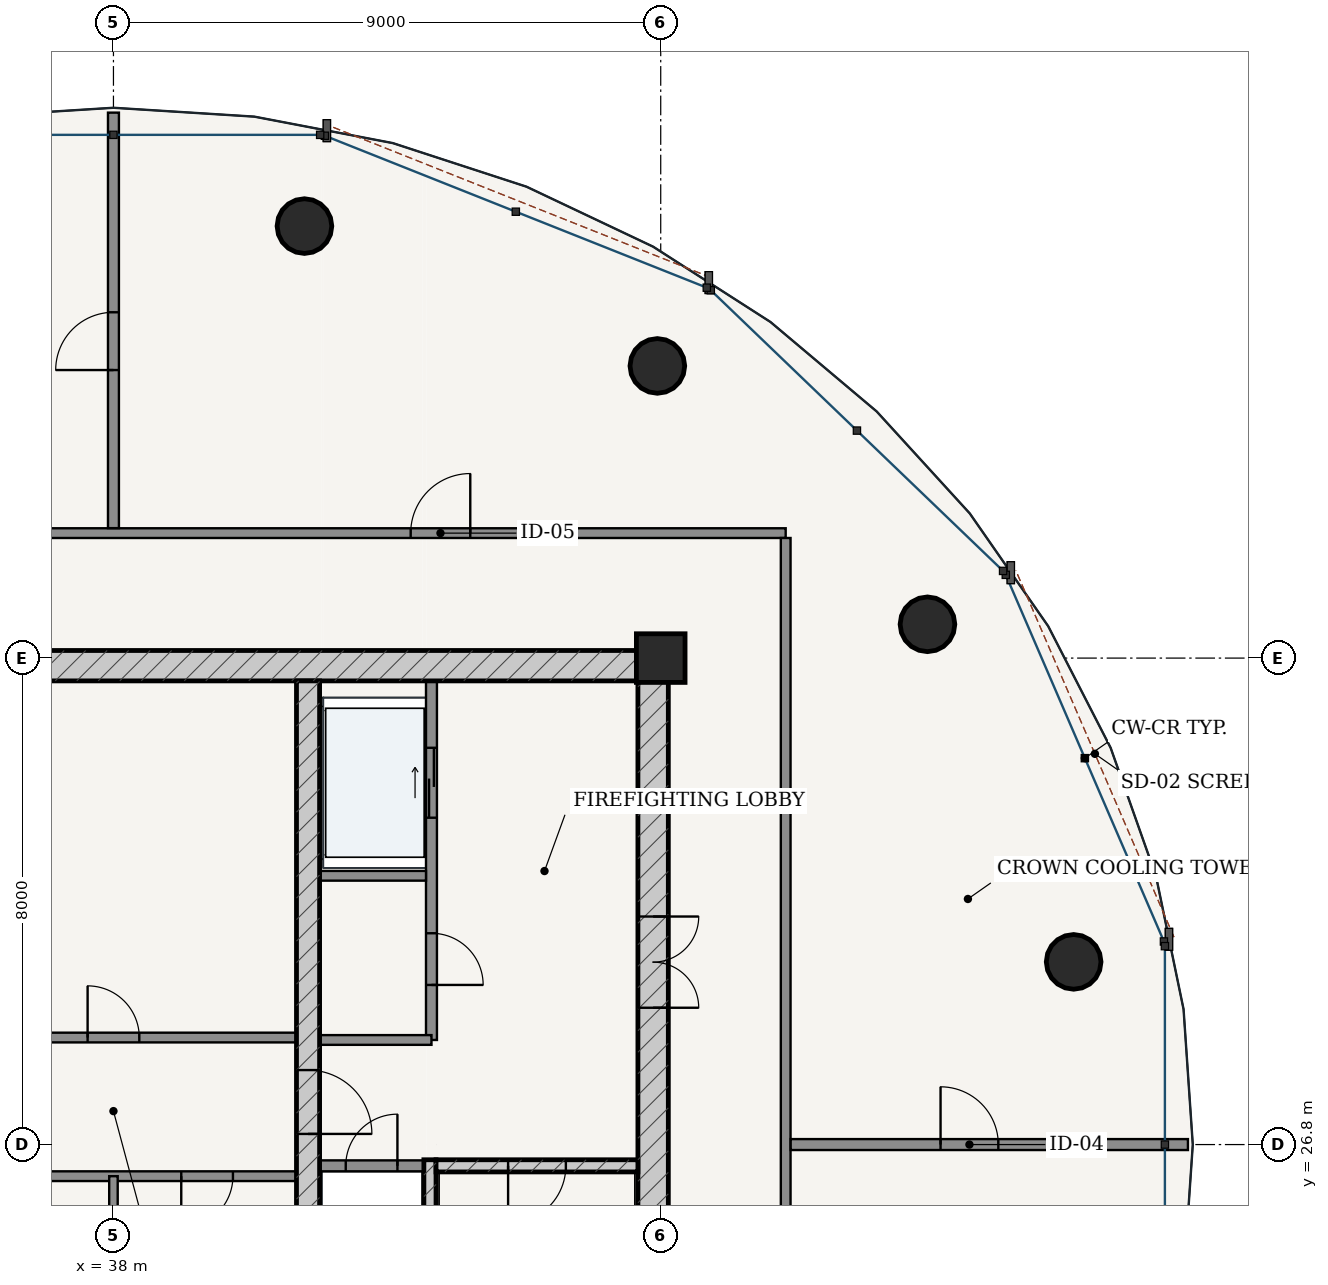
"""IFC4 building model, lengths in metres.
Left out: names, types, materials, properties, quantities, classifications, styles, units other than length and angle.
Written with IfcOpenShell. Run it as: python <this file> out.ifc"""

import sys

from ifc_helpers import new_model, si_unit, direction, frame, frame_2d, origin, origin_2d, place, context, subcontext, project, spatial, rectangle, hollow_circle, extrude, source, transform, mapped, element, fill, save


model = new_model("IFC4")
c1 = context("Model", 3, precision=1e-05, world=origin(), true_north=direction((-0.2419218956, 0.970295726276)))
c2 = subcontext(c1, "Body", "Model", "MODEL_VIEW")
j1 = project(units=[si_unit("LENGTHUNIT", "METRE"), si_unit("PLANEANGLEUNIT", "RADIAN")], contexts=[c1])
p1 = place(None, origin())
s1 = spatial("IfcSite", under=j1, at=p1, CompositionType="ELEMENT")
p2 = place(p1, origin())
s2 = spatial("IfcBuilding", under=s1, at=p2, CompositionType="ELEMENT")
p3 = place(p2, frame((0.0, 0.0, 311.3)))
s3 = spatial("IfcBuildingStorey", under=s2, at=p3, CompositionType="ELEMENT", Elevation=311.3)
p4 = place(p3, frame((47.0, 34.8, 0.0), z_axis=(0.0, 0.0, 1.0), x_axis=(1.0, 0.0, 0.0)))
e1 = element("IfcColumn", 1, at=p4, inside=s3, PredefinedType="COLUMN", context=c2, shape_type="SweptSolid", body=[
    extrude(rectangle(XDim=0.8, YDim=0.8, at=origin_2d()), origin(), (0.0, 0.0, 1.0), 5.2),
])
p5 = place(p3, frame((28.875, 34.675, 0.0), z_axis=(0.0, 0.0, 1.0), x_axis=(1.0, 0.0, 0.0)))
e2 = element("IfcWall", 2, at=p5, inside=s3, PredefinedType="SHEAR", context=c2, shape_type="SweptSolid", body=[
    extrude(rectangle(XDim=18.25, YDim=0.5, at=frame_2d((9.125, 0.0))), origin(), (0.0, 0.0, 1.0), 4.78),
])
p6 = place(p3, frame((46.875, 19.175, 0.0), z_axis=(0.0, 0.0, 1.0), x_axis=(0.0, 1.0, 0.0)))
e3 = element("IfcWall", 3, at=p6, inside=s3, PredefinedType="SHEAR", context=c2, shape_type="SweptSolid", body=[
    extrude(rectangle(XDim=15.25, YDim=0.5, at=frame_2d((7.625, 0.0))), origin(), (0.0, 0.0, 1.0), 4.78),
])
p7 = place(p6, frame((9.875, 0.0, 0.0)))
e4 = element("IfcOpeningElement", 4, at=p7, cuts=e3, PredefinedType="OPENING", context=c2, shape_type="SweptSolid", body=[
    extrude(rectangle(XDim=1.5, YDim=2.2, at=frame_2d((0.75, 1.1))), frame((0.0, 0.26, 0.0), z_axis=(0.0, -1.0, 0.0), x_axis=(1.0, 0.0, 0.0)), (0.0, 0.0, 1.0), 0.52),
])
p8 = place(p3, frame((43.205, 19.175, 0.0), z_axis=(0.0, 0.0, 1.0), x_axis=(0.0, 1.0, 0.0)))
e5 = element("IfcWall", 5, at=p8, inside=s3, PredefinedType="SOLIDWALL", context=c2, shape_type="SweptSolid", body=[
    extrude(rectangle(XDim=7.375, YDim=0.2, at=frame_2d((3.688, 0.0))), origin(), (0.0, 0.0, 1.0), 4.78),
])
p9 = place(p3, frame((43.305, 26.45, 0.0), z_axis=(0.0, 0.0, 1.0), x_axis=(1.0, 0.0, 0.0)))
e6 = element("IfcWall", 6, at=p9, inside=s3, PredefinedType="SOLIDWALL", context=c2, shape_type="SweptSolid", body=[
    extrude(rectangle(XDim=3.32, YDim=0.2, at=frame_2d((1.66, 0.0))), origin(), (0.0, 0.0, 1.0), 4.78),
])
p10 = place(p9, frame((1.185, 0.0, 0.0)))
e7 = element("IfcOpeningElement", 7, at=p10, cuts=e6, PredefinedType="OPENING", context=c2, shape_type="SweptSolid", body=[
    extrude(rectangle(XDim=0.95, YDim=2.15, at=frame_2d((0.475, 1.075))), frame((0.0, 0.11, 0.0), z_axis=(0.0, -1.0, 0.0), x_axis=(1.0, 0.0, 0.0)), (0.0, 0.0, 1.0), 0.22),
])
p11 = place(p3, frame((41.2, 19.175, 0.0), z_axis=(0.0, 0.0, 1.0), x_axis=(0.0, 1.0, 0.0)))
e8 = element("IfcWall", 8, at=p11, inside=s3, PredefinedType="SHEAR", context=c2, shape_type="SweptSolid", body=[
    extrude(rectangle(XDim=15.25, YDim=0.38, at=frame_2d((7.625, 0.0))), origin(), (0.0, 0.0, 1.0), 4.78),
])
p12 = place(p11, frame((7.8, 0.0, 0.0)))
e9 = element("IfcOpeningElement", 9, at=p12, cuts=e8, PredefinedType="OPENING", context=c2, shape_type="SweptSolid", body=[
    extrude(rectangle(XDim=1.05, YDim=2.15, at=frame_2d((0.525, 1.075))), frame((0.0, 0.2, 0.0), z_axis=(0.0, -1.0, 0.0), x_axis=(1.0, 0.0, 0.0)), (0.0, 0.0, 1.0), 0.4),
])
for number, where, z_axis, x_axis in (
    (10, (53.791, 29.804, 0.0), (0.0, 0.0, 1.0), (1.0, 0.0, 0.0)),
    (11, (51.387, 35.356, 0.0), (0.0, 0.0, 1.0), (1.0, 0.0, 0.0)),
    (12, (46.945, 39.605, 0.0), (0.0, 0.0, 1.0), (1.0, 0.0, 0.0)),
    (13, (41.141, 41.904, 0.0), (0.0, 0.0, 1.0), (1.0, 0.0, 0.0)),
):
    element("IfcColumn", number, at=place(p3, frame(where, z_axis=z_axis, x_axis=x_axis)), inside=s3, PredefinedType="COLUMN", context=c2, shape_type="SweptSolid", body=[
        extrude(hollow_circle(Radius=0.45, WallThickness=0.032, at=origin_2d()), origin(), (0.0, 0.0, 1.0), 5.2),
    ])
p13 = place(p3, frame((41.39, 26.45, 0.0), z_axis=(0.0, 0.0, 1.0), x_axis=(1.0, 0.0, 0.0)))
e14 = element("IfcWall", 14, at=p13, inside=s3, PredefinedType="PARTITIONING", context=c2, shape_type="SweptSolid", body=[
    extrude(rectangle(XDim=1.71, YDim=0.18, at=frame_2d((0.855, 0.0))), origin(), (0.0, 0.0, 1.0), 4.78),
])
p14 = place(p13, frame((0.43, 0.0, 0.0)))
e15 = element("IfcOpeningElement", 15, at=p14, cuts=e14, PredefinedType="OPENING", context=c2, shape_type="SweptSolid", body=[
    extrude(rectangle(XDim=0.85, YDim=2.1, at=frame_2d((0.425, 1.05))), frame((0.0, 0.1, 0.0), z_axis=(0.0, -1.0, 0.0), x_axis=(1.0, 0.0, 0.0)), (0.0, 0.0, 1.0), 0.2),
])
p15 = place(p3, frame((43.23, 28.52, 0.0), z_axis=(0.0, 0.0, 1.0), x_axis=(0.0, 1.0, 0.0)))
e16 = element("IfcWall", 16, at=p15, inside=s3, PredefinedType="PARTITIONING", context=c2, shape_type="SweptSolid", body=[
    extrude(rectangle(XDim=5.905, YDim=0.18, at=frame_2d((2.953, 0.0))), origin(), (0.0, 0.0, 1.0), 4.78),
])
p16 = place(p15, frame((0.905, 0.0, 0.0)))
e17 = element("IfcOpeningElement", 17, at=p16, cuts=e16, PredefinedType="OPENING", context=c2, shape_type="SweptSolid", body=[
    extrude(rectangle(XDim=0.85, YDim=2.1, at=frame_2d((0.425, 1.05))), frame((0.0, 0.1, 0.0), z_axis=(0.0, -1.0, 0.0), x_axis=(1.0, 0.0, 0.0)), (0.0, 0.0, 1.0), 0.2),
])
p17 = place(p15, frame((3.655, 0.0, 0.0)))
e18 = element("IfcOpeningElement", 18, at=p17, cuts=e16, PredefinedType="OPENING", context=c2, shape_type="SweptSolid", body=[
    extrude(rectangle(XDim=1.15, YDim=2.2, at=frame_2d((0.575, 1.1))), frame((0.0, 0.1, 0.0), z_axis=(0.0, -1.0, 0.0), x_axis=(1.0, 0.0, 0.0)), (0.0, 0.0, 1.0), 0.2),
])
p18 = place(p3, frame((41.39, 31.22, 0.0), z_axis=(0.0, 0.0, 1.0), x_axis=(1.0, 0.0, 0.0)))
e19 = element("IfcWall", 19, at=p18, inside=s3, PredefinedType="PARTITIONING", context=c2, shape_type="SweptSolid", body=[
    extrude(rectangle(XDim=1.75, YDim=0.16, at=frame_2d((0.875, 0.0))), origin(), (0.0, 0.0, 1.0), 4.78),
])
p19 = place(p3, frame((41.39, 28.52, 0.0), z_axis=(0.0, 0.0, 1.0), x_axis=(1.0, 0.0, 0.0)))
e20 = element("IfcWall", 20, at=p19, inside=s3, PredefinedType="PARTITIONING", context=c2, shape_type="SweptSolid", body=[
    extrude(rectangle(XDim=1.84, YDim=0.16, at=frame_2d((0.92, 0.0))), origin(), (0.0, 0.0, 1.0), 4.78),
])
p20 = place(p3, frame((34.99, 28.56, 0.0), z_axis=(0.0, 0.0, 1.0), x_axis=(1.0, 0.0, 0.0)))
e21 = element("IfcWall", 21, at=p20, inside=s3, PredefinedType="PARTITIONING", context=c2, shape_type="SweptSolid", body=[
    extrude(rectangle(XDim=6.02, YDim=0.16, at=frame_2d((3.01, 0.0))), origin(), (0.0, 0.0, 1.0), 4.78),
])
p21 = place(p20, frame((2.585, 0.0, 0.0)))
e22 = element("IfcOpeningElement", 22, at=p21, cuts=e21, PredefinedType="OPENING", context=c2, shape_type="SweptSolid", body=[
    extrude(rectangle(XDim=0.85, YDim=2.1, at=frame_2d((0.425, 1.05))), frame((0.0, 0.09, 0.0), z_axis=(0.0, -1.0, 0.0), x_axis=(1.0, 0.0, 0.0)), (0.0, 0.0, 1.0), 0.18),
])
p22 = place(p3, frame((34.99, 26.28, 0.0), z_axis=(0.0, 0.0, 1.0), x_axis=(1.0, 0.0, 0.0)))
e23 = element("IfcWall", 23, at=p22, inside=s3, PredefinedType="PARTITIONING", context=c2, shape_type="SweptSolid", body=[
    extrude(rectangle(XDim=6.02, YDim=0.16, at=frame_2d((3.01, 0.0))), origin(), (0.0, 0.0, 1.0), 4.78),
])
p23 = place(p22, frame((1.045, 0.0, 0.0)))
e24 = element("IfcOpeningElement", 24, at=p23, cuts=e23, PredefinedType="OPENING", context=c2, shape_type="SweptSolid", body=[
    extrude(rectangle(XDim=0.85, YDim=2.1, at=frame_2d((0.425, 1.05))), frame((0.0, 0.09, 0.0), z_axis=(0.0, -1.0, 0.0), x_axis=(1.0, 0.0, 0.0)), (0.0, 0.0, 1.0), 0.18),
])
p24 = place(p22, frame((4.125, 0.0, 0.0)))
e25 = element("IfcOpeningElement", 25, at=p24, cuts=e23, PredefinedType="OPENING", context=c2, shape_type="SweptSolid", body=[
    extrude(rectangle(XDim=0.85, YDim=2.1, at=frame_2d((0.425, 1.05))), frame((0.0, 0.09, 0.0), z_axis=(0.0, -1.0, 0.0), x_axis=(1.0, 0.0, 0.0)), (0.0, 0.0, 1.0), 0.18),
])
p25 = place(p3, frame((38.0, 23.72, 0.0), z_axis=(0.0, 0.0, 1.0), x_axis=(0.0, 1.0, 0.0)))
e26 = element("IfcWall", 26, at=p25, inside=s3, PredefinedType="PARTITIONING", context=c2, shape_type="SweptSolid", body=[
    extrude(rectangle(XDim=2.56, YDim=0.14, at=frame_2d((1.28, 0.0))), origin(), (0.0, 0.0, 1.0), 4.78),
])
p26 = place(p3, frame((26.945, 36.855, 0.0), z_axis=(0.0, 0.0, 1.0), x_axis=(1.0, 0.0, 0.0)))
e27 = element("IfcWall", 27, at=p26, inside=s3, PredefinedType="PARTITIONING", context=c2, shape_type="SweptSolid", body=[
    extrude(rectangle(XDim=22.11, YDim=0.16, at=frame_2d((11.055, 0.0))), origin(), (0.0, 0.0, 1.0), 4.352),
])
p27 = place(p26, frame((15.943, 0.0, 0.0)))
e28 = element("IfcOpeningElement", 28, at=p27, cuts=e27, PredefinedType="OPENING", context=c2, shape_type="SweptSolid", body=[
    extrude(rectangle(XDim=0.98, YDim=2.2, at=frame_2d((0.49, 1.1))), frame((0.0, 0.09, 0.0), z_axis=(0.0, -1.0, 0.0), x_axis=(1.0, 0.0, 0.0)), (0.0, 0.0, 1.0), 0.18),
])
p28 = place(p26, frame((5.187, 0.0, 0.0)))
e29 = element("IfcOpeningElement", 29, at=p28, cuts=e27, PredefinedType="OPENING", context=c2, shape_type="SweptSolid", body=[
    extrude(rectangle(XDim=0.98, YDim=2.2, at=frame_2d((0.49, 1.1))), frame((0.0, 0.09, 0.0), z_axis=(0.0, -1.0, 0.0), x_axis=(1.0, 0.0, 0.0)), (0.0, 0.0, 1.0), 0.18),
])
p29 = place(p3, frame((49.055, 16.825, 0.0), z_axis=(0.0, 0.0, 1.0), x_axis=(0.0, 1.0, 0.0)))
e30 = element("IfcWall", 30, at=p29, inside=s3, PredefinedType="PARTITIONING", context=c2, shape_type="SweptSolid", body=[
    extrude(rectangle(XDim=19.95, YDim=0.16, at=frame_2d((9.975, 0.0))), origin(), (0.0, 0.0, 1.0), 4.352),
])
p30 = place(p3, frame((49.137, 26.8, 0.0), z_axis=(0.0, 0.0, 1.0), x_axis=(1.0, 0.0, 0.0)))
e31 = element("IfcWall", 31, at=p30, inside=s3, PredefinedType="PARTITIONING", context=c2, shape_type="SweptSolid", body=[
    extrude(rectangle(XDim=6.533, YDim=0.18, at=frame_2d((3.267, 0.0))), origin(), (0.0, 0.0, 1.0), 4.411),
])
p31 = place(p30, frame((2.465, 0.0, 0.0)))
e32 = element("IfcOpeningElement", 32, at=p31, cuts=e31, PredefinedType="OPENING", context=c2, shape_type="SweptSolid", body=[
    extrude(rectangle(XDim=0.95, YDim=2.15, at=frame_2d((0.475, 1.075))), frame((0.0, 0.1, 0.0), z_axis=(0.0, -1.0, 0.0), x_axis=(1.0, 0.0, 0.0)), (0.0, 0.0, 1.0), 0.2),
])
p32 = place(p3, frame((38.0, 36.937, 0.0), z_axis=(0.0, 0.0, 1.0), x_axis=(0.0, 1.0, 0.0)))
e33 = element("IfcWall", 33, at=p32, inside=s3, PredefinedType="PARTITIONING", context=c2, shape_type="SweptSolid", body=[
    extrude(rectangle(XDim=6.833, YDim=0.18, at=frame_2d((3.417, 0.0))), origin(), (0.0, 0.0, 1.0), 4.411),
])
p33 = place(p32, frame((2.6, 0.0, 0.0)))
e34 = element("IfcOpeningElement", 34, at=p33, cuts=e33, PredefinedType="OPENING", context=c2, shape_type="SweptSolid", body=[
    extrude(rectangle(XDim=0.95, YDim=2.15, at=frame_2d((0.475, 1.075))), frame((0.0, 0.1, 0.0), z_axis=(0.0, -1.0, 0.0), x_axis=(1.0, 0.0, 0.0)), (0.0, 0.0, 1.0), 0.2),
])
m1 = source(origin(), c2, "Body", "SweptSolid", [
    extrude(rectangle(XDim=1.5, YDim=2.2, at=frame_2d((0.75, 1.1))), frame((0.0, 0.025, 0.0), z_axis=(0.0, -1.0, 0.0), x_axis=(1.0, 0.0, 0.0)), (0.0, 0.0, 1.0), 0.05),
])
p34 = place(p7, frame((1.5, 0.0, 0.0), z_axis=(0.0, 0.0, 1.0), x_axis=(-1.0, 0.0, 0.0)))
e35 = element("IfcDoor", 35, at=p34, inside=s3, OperationType="DOUBLE_DOOR_SINGLE_SWING", PredefinedType="DOOR", context=c2, shape_type="MappedRepresentation", body=[
    mapped(m1, transform((0.0, 0.0, 0.0), scale=1.0)),
])
fill(e4, e35)
m2 = source(origin(), c2, "Body", "SweptSolid", [
    extrude(rectangle(XDim=1.05, YDim=2.15, at=frame_2d((0.525, 1.075))), frame((0.0, 0.025, 0.0), z_axis=(0.0, -1.0, 0.0), x_axis=(1.0, 0.0, 0.0)), (0.0, 0.0, 1.0), 0.05),
])
p35 = place(p12, frame((1.05, 0.0, 0.0), z_axis=(0.0, 0.0, 1.0), x_axis=(-1.0, 0.0, 0.0)))
e36 = element("IfcDoor", 36, at=p35, inside=s3, OperationType="SINGLE_SWING_RIGHT", PredefinedType="DOOR", context=c2, shape_type="MappedRepresentation", body=[
    mapped(m2, transform((0.0, 0.0, 0.0), scale=1.0)),
])
fill(e9, e36)
m3 = source(origin(), c2, "Body", "SweptSolid", [
    extrude(rectangle(XDim=0.95, YDim=2.15, at=frame_2d((0.475, 1.075))), frame((0.0, 0.025, 0.0), z_axis=(0.0, -1.0, 0.0), x_axis=(1.0, 0.0, 0.0)), (0.0, 0.0, 1.0), 0.05),
])
p36 = place(p10, frame((0.95, 0.0, 0.0), z_axis=(0.0, 0.0, 1.0), x_axis=(-1.0, 0.0, 0.0)))
e37 = element("IfcDoor", 37, at=p36, inside=s3, OperationType="SINGLE_SWING_RIGHT", PredefinedType="DOOR", context=c2, shape_type="MappedRepresentation", body=[
    mapped(m3, transform((0.0, 0.0, 0.0), scale=1.0)),
])
fill(e7, e37)
m4 = source(origin(), c2, "Body", "SweptSolid", [
    extrude(rectangle(XDim=0.85, YDim=2.1, at=frame_2d((0.425, 1.05))), frame((0.0, 0.025, 0.0), z_axis=(0.0, -1.0, 0.0), x_axis=(1.0, 0.0, 0.0)), (0.0, 0.0, 1.0), 0.05),
])
p37 = place(p14, origin())
e38 = element("IfcDoor", 38, at=p37, inside=s3, OperationType="SINGLE_SWING_RIGHT", PredefinedType="DOOR", context=c2, shape_type="MappedRepresentation", body=[
    mapped(m4, transform((0.0, 0.0, 0.0), scale=1.0)),
])
fill(e15, e38)
p38 = place(p16, frame((0.85, 0.0, 0.0), z_axis=(0.0, 0.0, 1.0), x_axis=(-1.0, 0.0, 0.0)))
e39 = element("IfcDoor", 39, at=p38, inside=s3, OperationType="SINGLE_SWING_RIGHT", PredefinedType="DOOR", context=c2, shape_type="MappedRepresentation", body=[
    mapped(m4, transform((0.0, 0.0, 0.0), scale=1.0)),
])
fill(e17, e39)
p39 = place(p21, origin())
e40 = element("IfcDoor", 40, at=p39, inside=s3, OperationType="SINGLE_SWING_LEFT", PredefinedType="DOOR", context=c2, shape_type="MappedRepresentation", body=[
    mapped(m4, transform((0.0, 0.0, 0.0), scale=1.0)),
])
fill(e22, e40)
p40 = place(p24, frame((0.85, 0.0, 0.0), z_axis=(0.0, 0.0, 1.0), x_axis=(-1.0, 0.0, 0.0)))
e41 = element("IfcDoor", 41, at=p40, inside=s3, OperationType="SINGLE_SWING_RIGHT", PredefinedType="DOOR", context=c2, shape_type="MappedRepresentation", body=[
    mapped(m4, transform((0.0, 0.0, 0.0), scale=1.0)),
])
fill(e25, e41)
m5 = source(origin(), c2, "Body", "SweptSolid", [
    extrude(rectangle(XDim=1.15, YDim=2.2, at=frame_2d((0.575, 1.1))), frame((0.0, 0.025, 0.0), z_axis=(0.0, -1.0, 0.0), x_axis=(1.0, 0.0, 0.0)), (0.0, 0.0, 1.0), 0.05),
])
p41 = place(p17, origin())
e42 = element("IfcDoor", 42, at=p41, inside=s3, OperationType="DOUBLE_DOOR_SLIDING", PredefinedType="DOOR", context=c2, shape_type="MappedRepresentation", body=[
    mapped(m5, transform((0.0, 0.0, 0.0), scale=1.0)),
])
fill(e18, e42)
m6 = source(origin(), c2, "Body", "SweptSolid", [
    extrude(rectangle(XDim=0.98, YDim=2.2, at=frame_2d((0.49, 1.1))), frame((0.0, 0.025, 0.0), z_axis=(0.0, -1.0, 0.0), x_axis=(1.0, 0.0, 0.0)), (0.0, 0.0, 1.0), 0.05),
])
p42 = place(p27, origin())
e43 = element("IfcDoor", 43, at=p42, inside=s3, OperationType="SINGLE_SWING_RIGHT", PredefinedType="DOOR", context=c2, shape_type="MappedRepresentation", body=[
    mapped(m6, transform((0.0, 0.0, 0.0), scale=1.0)),
])
fill(e28, e43)
p43 = place(p31, origin())
e44 = element("IfcDoor", 44, at=p43, inside=s3, OperationType="SINGLE_SWING_LEFT", PredefinedType="DOOR", context=c2, shape_type="MappedRepresentation", body=[
    mapped(m3, transform((0.0, 0.0, 0.0), scale=1.0)),
])
fill(e32, e44)
p44 = place(p33, origin())
e45 = element("IfcDoor", 45, at=p44, inside=s3, OperationType="SINGLE_SWING_LEFT", PredefinedType="DOOR", context=c2, shape_type="MappedRepresentation", body=[
    mapped(m3, transform((0.0, 0.0, 0.0), scale=1.0)),
])
fill(e34, e45)
save(model, sys.argv[1])
